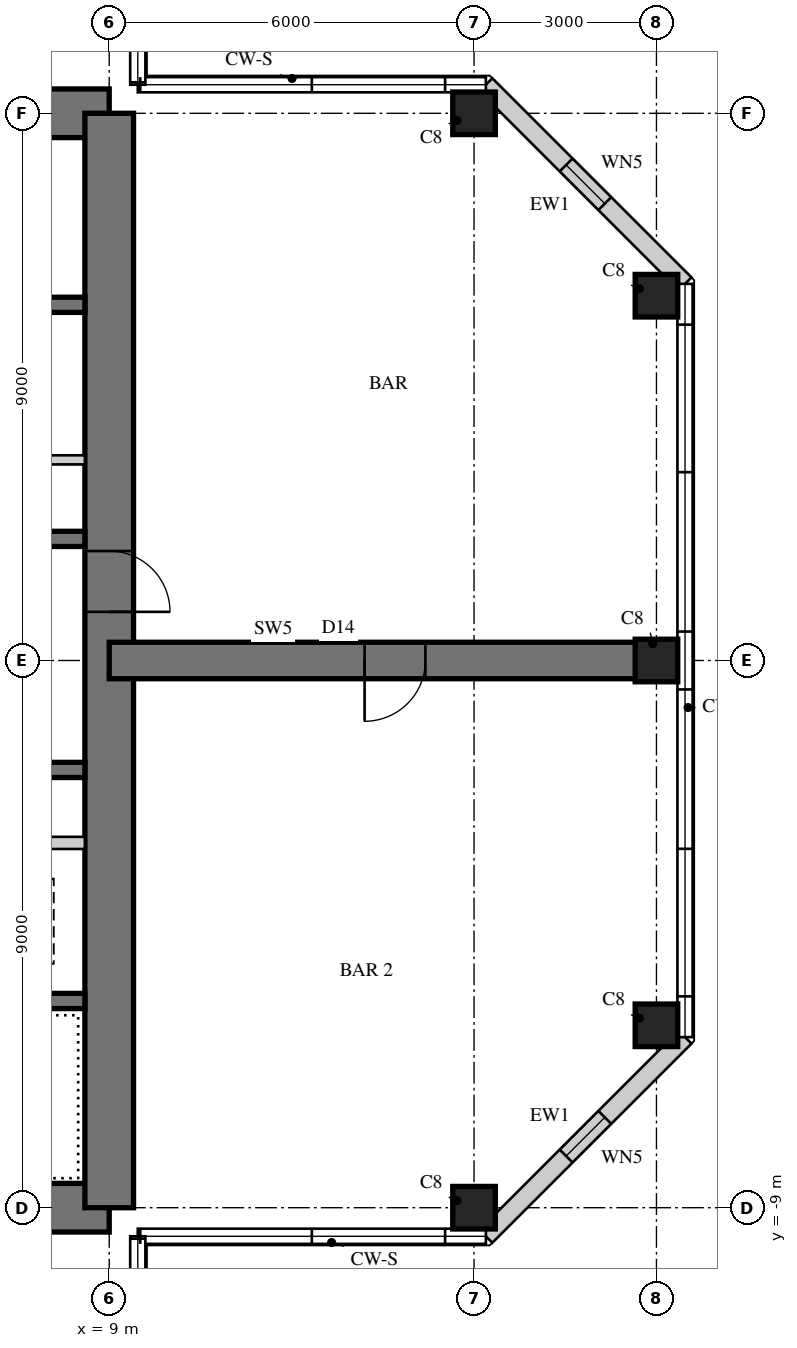
"""IFC4 building model, lengths in metres.
Left out: names, types, materials, properties, quantities, classifications, styles, units other than length and angle.
Written with IfcOpenShell. Run it as: python <this file> out.ifc"""

import sys

from ifc_helpers import new_model, si_unit, direction, frame, frame_2d, origin, origin_2d, place, context, subcontext, project, spatial, rectangle, hollow_rectangle, extrude, element, fill, save


model = new_model("IFC4")
c1 = context("Model", 3, precision=1e-05, world=origin(), true_north=direction((0.0, 1.0)))
c2 = subcontext(c1, "Body", "Model", "MODEL_VIEW")
j1 = project(units=[si_unit("LENGTHUNIT", "METRE"), si_unit("PLANEANGLEUNIT", "RADIAN")], contexts=[c1])
p1 = place(None, origin())
s1 = spatial("IfcSite", under=j1, at=p1, CompositionType="ELEMENT")
p2 = place(p1, origin())
s2 = spatial("IfcBuilding", under=s1, at=p2, CompositionType="ELEMENT")
p3 = place(p2, frame((0.0, 0.0, 288.3)))
s3 = spatial("IfcBuildingStorey", under=s2, at=p3, CompositionType="ELEMENT", Elevation=288.3)
p4 = place(p3, frame((9.0, 9.0, 0.0), z_axis=(0.0, 0.0, 1.0), x_axis=(-1.0, 0.0, 0.0)))
e1 = element("IfcWall", 1, at=p4, inside=s3, PredefinedType="SHEAR", context=c2, shape_type="SweptSolid", body=[
    extrude(rectangle(XDim=18.0, YDim=0.8, at=frame_2d((9.0, 0.0))), origin(), (0.0, 0.0, 1.0), 5.0),
])
p5 = place(p4, frame((9.8, 0.0, 0.0)))
e2 = element("IfcOpeningElement", 2, at=p5, cuts=e1, PredefinedType="OPENING", context=c2, shape_type="SweptSolid", body=[
    extrude(rectangle(XDim=1.0, YDim=2.4, at=frame_2d((0.5, 1.2))), frame((0.0, 0.41, 0.0), z_axis=(0.0, -1.0, 0.0), x_axis=(1.0, 0.0, 0.0)), (0.0, 0.0, 1.0), 0.82),
])
p6 = place(p3, frame((-9.0, -9.0, 0.0), z_axis=(0.0, 0.0, 1.0), x_axis=(1.0, 0.0, 0.0)))
e3 = element("IfcWall", 3, at=p6, inside=s3, PredefinedType="SHEAR", context=c2, shape_type="SweptSolid", body=[
    extrude(rectangle(XDim=18.0, YDim=0.8, at=frame_2d((9.0, 0.0))), origin(), (0.0, 0.0, 1.0), 5.0),
])
p7 = place(p6, frame((9.8, 0.0, 0.0)))
e4 = element("IfcOpeningElement", 4, at=p7, cuts=e3, PredefinedType="OPENING", context=c2, shape_type="SweptSolid", body=[
    extrude(rectangle(XDim=1.0, YDim=2.4, at=frame_2d((0.5, 1.2))), frame((0.0, 0.41, 0.0), z_axis=(0.0, -1.0, 0.0), x_axis=(1.0, 0.0, 0.0)), (0.0, 0.0, 1.0), 0.82),
])
p8 = place(p3, frame((9.0, -9.0, 0.0), z_axis=(0.0, 0.0, 1.0), x_axis=(0.0, 1.0, 0.0)))
e5 = element("IfcWall", 5, at=p8, inside=s3, PredefinedType="SHEAR", context=c2, shape_type="SweptSolid", body=[
    extrude(rectangle(XDim=18.0, YDim=0.8, at=frame_2d((9.0, 0.0))), origin(), (0.0, 0.0, 1.0), 5.0),
])
p9 = place(p8, frame((9.8, 0.0, 0.0)))
e6 = element("IfcOpeningElement", 6, at=p9, cuts=e5, PredefinedType="OPENING", context=c2, shape_type="SweptSolid", body=[
    extrude(rectangle(XDim=1.0, YDim=2.4, at=frame_2d((0.5, 1.2))), frame((0.0, 0.41, 0.0), z_axis=(0.0, -1.0, 0.0), x_axis=(1.0, 0.0, 0.0)), (0.0, 0.0, 1.0), 0.82),
])
p10 = place(p3, frame((1.925, 2.0, 0.0), z_axis=(0.0, 0.0, 1.0), x_axis=(1.0, 0.0, 0.0)))
e7 = element("IfcWall", 7, at=p10, inside=s3, PredefinedType="SHEAR", context=c2, shape_type="SweptSolid", body=[
    extrude(rectangle(XDim=6.675, YDim=0.25, at=frame_2d((3.337, 0.0))), origin(), (0.0, 0.0, 1.0), 5.0),
])
p11 = place(p3, frame((1.925, 5.85, 0.0), z_axis=(0.0, 0.0, 1.0), x_axis=(1.0, 0.0, 0.0)))
e8 = element("IfcWall", 8, at=p11, inside=s3, PredefinedType="SHEAR", context=c2, shape_type="SweptSolid", body=[
    extrude(rectangle(XDim=6.675, YDim=0.25, at=frame_2d((3.337, 0.0))), origin(), (0.0, 0.0, 1.0), 5.0),
])
p12 = place(p11, frame((0.546, 0.0, 0.0)))
e9 = element("IfcOpeningElement", 9, at=p12, cuts=e8, PredefinedType="OPENING", context=c2, shape_type="SweptSolid", body=[
    extrude(rectangle(XDim=1.0, YDim=2.1, at=frame_2d((0.5, 1.05))), frame((0.0, 0.135, 0.0), z_axis=(0.0, -1.0, 0.0), x_axis=(1.0, 0.0, 0.0)), (0.0, 0.0, 1.0), 0.27),
])
p13 = place(p3, frame((1.925, 3.3, 0.0), z_axis=(0.0, 0.0, 1.0), x_axis=(1.0, 0.0, 0.0)))
e10 = element("IfcWall", 10, at=p13, inside=s3, PredefinedType="PARTITIONING", context=c2, shape_type="SweptSolid", body=[
    extrude(rectangle(XDim=6.675, YDim=0.15, at=frame_2d((3.337, 0.0))), origin(), (0.0, 0.0, 1.0), 5.0),
])
p14 = place(p13, frame((0.075, 0.0, 0.0)))
e11 = element("IfcOpeningElement", 11, at=p14, cuts=e10, PredefinedType="OPENING", context=c2, shape_type="SweptSolid", body=[
    extrude(rectangle(XDim=0.8, YDim=2.1, at=frame_2d((0.4, 1.05))), frame((0.0, 0.085, 0.0), z_axis=(0.0, -1.0, 0.0), x_axis=(1.0, 0.0, 0.0)), (0.0, 0.0, 1.0), 0.17),
])
p15 = place(p13, frame((3.675, 0.0, 0.0)))
e12 = element("IfcOpeningElement", 12, at=p15, cuts=e10, PredefinedType="OPENING", context=c2, shape_type="SweptSolid", body=[
    extrude(rectangle(XDim=0.8, YDim=2.1, at=frame_2d((0.4, 1.05))), frame((0.0, 0.085, 0.0), z_axis=(0.0, -1.0, 0.0), x_axis=(1.0, 0.0, 0.0)), (0.0, 0.0, 1.0), 0.17),
])
p16 = place(p3, frame((2.125, -1.8, 0.0), z_axis=(0.0, 0.0, 1.0), x_axis=(1.0, 0.0, 0.0)))
e13 = element("IfcWall", 13, at=p16, inside=s3, PredefinedType="SHEAR", context=c2, shape_type="SweptSolid", body=[
    extrude(rectangle(XDim=6.475, YDim=0.25, at=frame_2d((3.238, 0.0))), origin(), (0.0, 0.0, 1.0), 5.0),
])
p17 = place(p3, frame((2.125, -5.6, 0.0), z_axis=(0.0, 0.0, 1.0), x_axis=(1.0, 0.0, 0.0)))
e14 = element("IfcWall", 14, at=p17, inside=s3, PredefinedType="SHEAR", context=c2, shape_type="SweptSolid", body=[
    extrude(rectangle(XDim=6.475, YDim=0.25, at=frame_2d((3.238, 0.0))), origin(), (0.0, 0.0, 1.0), 5.0),
])
p18 = place(p17, frame((0.175, 0.0, 0.0)))
e15 = element("IfcOpeningElement", 15, at=p18, cuts=e14, PredefinedType="OPENING", context=c2, shape_type="SweptSolid", body=[
    extrude(rectangle(XDim=1.0, YDim=2.1, at=frame_2d((0.5, 1.05))), frame((0.0, 0.135, 0.0), z_axis=(0.0, -1.0, 0.0), x_axis=(1.0, 0.0, 0.0)), (0.0, 0.0, 1.0), 0.27),
])
p19 = place(p3, frame((5.725, -3.0, 0.0), z_axis=(0.0, 0.0, 1.0), x_axis=(1.0, 0.0, 0.0)))
e16 = element("IfcWall", 16, at=p19, inside=s3, PredefinedType="PARTITIONING", context=c2, shape_type="SweptSolid", body=[
    extrude(rectangle(XDim=2.875, YDim=0.2, at=frame_2d((1.438, 0.0))), origin(), (0.0, 0.0, 1.0), 5.0),
])
p20 = place(p3, frame((9.0, 0.0, 0.0), z_axis=(0.0, 0.0, 1.0), x_axis=(1.0, 0.0, 0.0)))
e17 = element("IfcWall", 17, at=p20, inside=s3, PredefinedType="SHEAR", context=c2, shape_type="SweptSolid", body=[
    extrude(rectangle(XDim=9.0, YDim=0.6, at=frame_2d((4.5, 0.0))), origin(), (0.0, 0.0, 1.0), 5.0),
])
p21 = place(p20, frame((4.2, 0.0, 0.0)))
e18 = element("IfcOpeningElement", 18, at=p21, cuts=e17, PredefinedType="OPENING", context=c2, shape_type="SweptSolid", body=[
    extrude(rectangle(XDim=1.0, YDim=2.2, at=frame_2d((0.5, 1.1))), frame((0.0, 0.31, 0.0), z_axis=(0.0, -1.0, 0.0), x_axis=(1.0, 0.0, 0.0)), (0.0, 0.0, 1.0), 0.62),
])
for number, where, z_axis, x_axis in (
    (19, (15.0, -9.0, 0.0), (0.0, 0.0, 1.0), (1.0, 0.0, 0.0)),
    (20, (15.0, 9.0, 0.0), (0.0, 0.0, 1.0), (1.0, 0.0, 0.0)),
    (21, (18.0, -6.0, 0.0), (0.0, 0.0, 1.0), (1.0, 0.0, 0.0)),
    (22, (18.0, 0.0, 0.0), (0.0, 0.0, 1.0), (1.0, 0.0, 0.0)),
    (23, (18.0, 6.0, 0.0), (0.0, 0.0, 1.0), (1.0, 0.0, 0.0)),
):
    element("IfcColumn", number, at=place(p3, frame(where, z_axis=z_axis, x_axis=x_axis)), inside=s3, PredefinedType="COLUMN", context=c2, shape_type="SweptSolid", body=[
        extrude(rectangle(XDim=0.7, YDim=0.7, at=origin_2d()), origin(), (0.0, 0.0, 1.0), 5.0),
    ])
p22 = place(p3, frame((15.195, -9.47, 0.0), z_axis=(0.0, 0.0, 1.0), x_axis=(0.707106781187, 0.707106781187, 0.0)))
e24 = element("IfcWall", 24, at=p22, inside=s3, PredefinedType="SOLIDWALL", context=c2, shape_type="SweptSolid", body=[
    extrude(rectangle(XDim=4.632, YDim=0.3, at=frame_2d((2.316, 0.0))), origin(), (0.0, 0.0, 1.0), 4.75),
])
p23 = place(p22, frame((1.866, 0.0, 0.3)))
e25 = element("IfcOpeningElement", 25, at=p23, cuts=e24, PredefinedType="OPENING", context=c2, shape_type="SweptSolid", body=[
    extrude(rectangle(XDim=0.9, YDim=2.4, at=frame_2d((0.45, 1.2))), frame((0.0, 0.16, 0.0), z_axis=(0.0, -1.0, 0.0), x_axis=(1.0, 0.0, 0.0)), (0.0, 0.0, 1.0), 0.32),
])
p24 = place(p3, frame((18.47, 6.195, 0.0), z_axis=(0.0, 0.0, 1.0), x_axis=(-0.707106781187, 0.707106781187, 0.0)))
e26 = element("IfcWall", 26, at=p24, inside=s3, PredefinedType="SOLIDWALL", context=c2, shape_type="SweptSolid", body=[
    extrude(rectangle(XDim=4.632, YDim=0.3, at=frame_2d((2.316, 0.0))), origin(), (0.0, 0.0, 1.0), 4.75),
])
p25 = place(p24, frame((1.866, 0.0, 0.3)))
e27 = element("IfcOpeningElement", 27, at=p25, cuts=e26, PredefinedType="OPENING", context=c2, shape_type="SweptSolid", body=[
    extrude(rectangle(XDim=0.9, YDim=2.4, at=frame_2d((0.45, 1.2))), frame((0.0, 0.16, 0.0), z_axis=(0.0, -1.0, 0.0), x_axis=(1.0, 0.0, 0.0)), (0.0, 0.0, 1.0), 0.32),
])
p26 = place(p23, origin())
e28 = element("IfcWindow", 28, at=p26, inside=s3, PartitioningType="SINGLE_PANEL", PredefinedType="WINDOW", context=c2, shape_type="SweptSolid", body=[
    extrude(hollow_rectangle(XDim=0.9, YDim=2.4, WallThickness=0.06, at=frame_2d((0.45, 1.2))), frame((0.0, 0.03, 0.0), z_axis=(0.0, -1.0, 0.0), x_axis=(1.0, 0.0, 0.0)), (0.0, 0.0, 1.0), 0.06),
    extrude(rectangle(XDim=0.779, YDim=2.279, at=frame_2d((0.45, 1.2))), frame((0.0, 0.03, 0.0), z_axis=(0.0, -1.0, 0.0), x_axis=(1.0, 0.0, 0.0)), (0.0, 0.0, 1.0), 0.06),
])
fill(e25, e28)
p27 = place(p25, origin())
e29 = element("IfcWindow", 29, at=p27, inside=s3, PartitioningType="SINGLE_PANEL", PredefinedType="WINDOW", context=c2, shape_type="SweptSolid", body=[
    extrude(hollow_rectangle(XDim=0.9, YDim=2.4, WallThickness=0.06, at=frame_2d((0.45, 1.2))), frame((0.0, 0.03, 0.0), z_axis=(0.0, -1.0, 0.0), x_axis=(1.0, 0.0, 0.0)), (0.0, 0.0, 1.0), 0.06),
    extrude(rectangle(XDim=0.779, YDim=2.279, at=frame_2d((0.45, 1.2))), frame((0.0, 0.03, 0.0), z_axis=(0.0, -1.0, 0.0), x_axis=(1.0, 0.0, 0.0)), (0.0, 0.0, 1.0), 0.06),
])
fill(e27, e29)
p28 = place(p21, frame((1.0, 0.0, 0.0), z_axis=(0.0, 0.0, 1.0), x_axis=(-1.0, 0.0, 0.0)))
e30 = element("IfcDoor", 30, at=p28, inside=s3, OperationType="SINGLE_SWING_RIGHT", PredefinedType="DOOR", context=c2, shape_type="SweptSolid", body=[
    extrude(rectangle(XDim=1.0, YDim=2.2, at=frame_2d((0.5, 1.1))), frame((0.0, 0.025, 0.0), z_axis=(0.0, -1.0, 0.0), x_axis=(1.0, 0.0, 0.0)), (0.0, 0.0, 1.0), 0.05),
])
fill(e18, e30)
p29 = place(p9, frame((1.0, 0.0, 0.0), z_axis=(0.0, 0.0, 1.0), x_axis=(-1.0, 0.0, 0.0)))
e31 = element("IfcDoor", 31, at=p29, inside=s3, OperationType="SINGLE_SWING_RIGHT", PredefinedType="DOOR", context=c2, shape_type="SweptSolid", body=[
    extrude(rectangle(XDim=1.0, YDim=2.4, at=frame_2d((0.5, 1.2))), frame((0.0, -0.005, 0.0), z_axis=(0.0, -1.0, 0.0), x_axis=(1.0, 0.0, 0.0)), (0.0, 0.0, 1.0), 0.05),
])
fill(e6, e31)
save(model, sys.argv[1])
